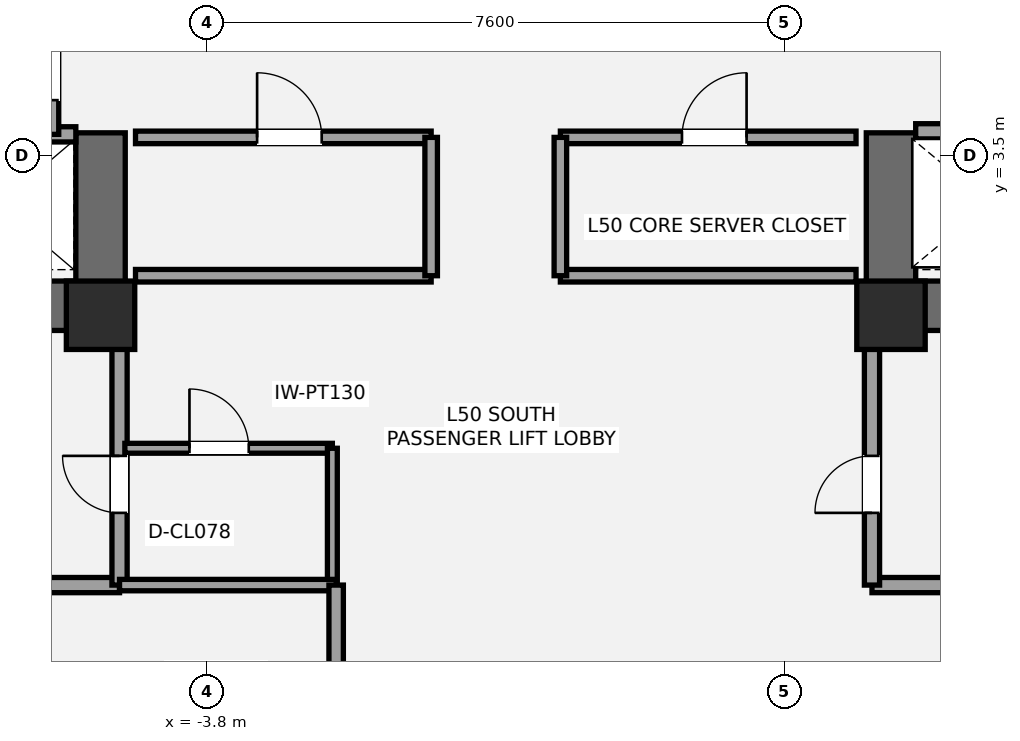
"""IFC4 building model, lengths in metres.
Left out: names, types, materials, properties, quantities, classifications, styles, units other than length and angle.
Written with IfcOpenShell. Run it as: python <this file> out.ifc"""

import sys

from ifc_helpers import new_model, si_unit, direction, frame, frame_2d, origin, origin_2d, place, context, subcontext, project, spatial, rectangle, extrude, element, fill, save


model = new_model("IFC4")
c1 = context("Model", 3, precision=1e-05, world=origin(), true_north=direction((0.0, 1.0)))
c2 = subcontext(c1, "Body", "Model", "MODEL_VIEW")
j1 = project(units=[si_unit("LENGTHUNIT", "METRE"), si_unit("PLANEANGLEUNIT", "RADIAN")], contexts=[c1])
p1 = place(None, origin())
s1 = spatial("IfcSite", under=j1, at=p1, CompositionType="ELEMENT")
p2 = place(p1, origin())
s2 = spatial("IfcBuilding", under=s1, at=p2, CompositionType="ELEMENT")
p3 = place(p2, frame((0.0, 0.0, 182.2)))
s3 = spatial("IfcBuildingStorey", under=s2, at=p3, CompositionType="ELEMENT", Elevation=182.2)
p4 = place(p3, frame((-4.875, 1.525, 0.0), z_axis=(0.0, 0.0, 1.0), x_axis=(-1.0, 0.0, 0.0)))
e1 = element("IfcWall", 1, at=p4, inside=s3, PredefinedType="SHEAR", context=c2, shape_type="SweptSolid", body=[
    extrude(rectangle(XDim=8.925, YDim=0.65, at=frame_2d((4.462, 0.0))), origin(), (0.0, 0.0, 1.0), 3.2),
])
p5 = place(p4, frame((5.425, 0.0, 0.0)))
e2 = element("IfcOpeningElement", 2, at=p5, cuts=e1, PredefinedType="OPENING", context=c2, shape_type="SweptSolid", body=[
    extrude(rectangle(XDim=1.05, YDim=2.15, at=frame_2d((0.525, 1.075))), frame((0.0, 0.335, 0.0), z_axis=(0.0, -1.0, 0.0), x_axis=(1.0, 0.0, 0.0)), (0.0, 0.0, 1.0), 0.67),
])
p6 = place(p4, frame((3.755, 0.0, 0.0)))
e3 = element("IfcOpeningElement", 3, at=p6, cuts=e1, PredefinedType="OPENING", context=c2, shape_type="SweptSolid", body=[
    extrude(rectangle(XDim=1.1, YDim=2.2, at=frame_2d((0.55, 1.1))), frame((0.0, 0.335, 0.0), z_axis=(0.0, -1.0, 0.0), x_axis=(1.0, 0.0, 0.0)), (0.0, 0.0, 1.0), 0.67),
])
p7 = place(p3, frame((-5.2, 1.2, 0.0), z_axis=(0.0, 0.0, 1.0), x_axis=(0.0, 1.0, 0.0)))
e4 = element("IfcWall", 4, at=p7, inside=s3, PredefinedType="SHEAR", context=c2, shape_type="SweptSolid", body=[
    extrude(rectangle(XDim=2.6, YDim=0.65, at=frame_2d((1.3, 0.0))), origin(), (0.0, 0.0, 1.0), 3.2),
])
p8 = place(p3, frame((13.8, 1.525, 0.0), z_axis=(0.0, 0.0, 1.0), x_axis=(-1.0, 0.0, 0.0)))
e5 = element("IfcWall", 5, at=p8, inside=s3, PredefinedType="SHEAR", context=c2, shape_type="SweptSolid", body=[
    extrude(rectangle(XDim=8.925, YDim=0.65, at=frame_2d((4.462, 0.0))), origin(), (0.0, 0.0, 1.0), 3.2),
])
p9 = place(p8, frame((2.45, 0.0, 0.0)))
e6 = element("IfcOpeningElement", 6, at=p9, cuts=e5, PredefinedType="OPENING", context=c2, shape_type="SweptSolid", body=[
    extrude(rectangle(XDim=1.05, YDim=2.15, at=frame_2d((0.525, 1.075))), frame((0.0, 0.335, 0.0), z_axis=(0.0, -1.0, 0.0), x_axis=(1.0, 0.0, 0.0)), (0.0, 0.0, 1.0), 0.67),
])
p10 = place(p8, frame((4.45, 0.0, 0.0)))
e7 = element("IfcOpeningElement", 7, at=p10, cuts=e5, PredefinedType="OPENING", context=c2, shape_type="SweptSolid", body=[
    extrude(rectangle(XDim=1.1, YDim=2.2, at=frame_2d((0.55, 1.1))), frame((0.0, 0.335, 0.0), z_axis=(0.0, -1.0, 0.0), x_axis=(1.0, 0.0, 0.0)), (0.0, 0.0, 1.0), 0.67),
])
p11 = place(p3, frame((5.2, 1.2, 0.0), z_axis=(0.0, 0.0, 1.0), x_axis=(0.0, 1.0, 0.0)))
e8 = element("IfcWall", 8, at=p11, inside=s3, PredefinedType="SHEAR", context=c2, shape_type="SweptSolid", body=[
    extrude(rectangle(XDim=2.6, YDim=0.65, at=frame_2d((1.3, 0.0))), origin(), (0.0, 0.0, 1.0), 3.2),
])
for number, where, z_axis, x_axis in (
    (9, (-5.2, 1.4, 0.0), (0.0, 0.0, 1.0), (1.0, 0.0, 0.0)),
    (10, (5.2, 1.4, 0.0), (0.0, 0.0, 1.0), (1.0, 0.0, 0.0)),
):
    element("IfcColumn", number, at=place(p3, frame(where, z_axis=z_axis, x_axis=x_axis)), inside=s3, PredefinedType="COLUMN", context=c2, shape_type="SweptSolid", body=[
        extrude(rectangle(XDim=0.9, YDim=0.9, at=origin_2d()), origin(), (0.0, 0.0, 1.0), 3.2),
    ])
p12 = place(p3, frame((-7.2, -2.15, 0.0), z_axis=(0.0, 0.0, 1.0), x_axis=(1.0, 0.0, 0.0)))
e11 = element("IfcWall", 11, at=p12, inside=s3, PredefinedType="SOLIDWALL", context=c2, shape_type="SweptSolid", body=[
    extrude(rectangle(XDim=2.25, YDim=0.2, at=frame_2d((1.125, 0.0))), origin(), (0.0, 0.0, 1.0), 3.02),
])
p13 = place(p3, frame((-4.95, -2.15, 0.0), z_axis=(0.0, 0.0, 1.0), x_axis=(0.0, 1.0, 0.0)))
e12 = element("IfcWall", 12, at=p13, inside=s3, PredefinedType="SOLIDWALL", context=c2, shape_type="SweptSolid", body=[
    extrude(rectangle(XDim=3.4, YDim=0.2, at=frame_2d((1.7, 0.0))), origin(), (0.0, 0.0, 1.0), 2.473),
])
p14 = place(p13, frame((0.95, 0.0, 0.0)))
e13 = element("IfcOpeningElement", 13, at=p14, cuts=e12, PredefinedType="OPENING", context=c2, shape_type="SweptSolid", body=[
    extrude(rectangle(XDim=0.75, YDim=2.1, at=frame_2d((0.375, 1.05))), frame((0.0, 0.11, 0.0), z_axis=(0.0, -1.0, 0.0), x_axis=(1.0, 0.0, 0.0)), (0.0, 0.0, 1.0), 0.22),
])
p15 = place(p3, frame((4.95, -2.15, 0.0), z_axis=(0.0, 0.0, 1.0), x_axis=(1.0, 0.0, 0.0)))
e14 = element("IfcWall", 14, at=p15, inside=s3, PredefinedType="SOLIDWALL", context=c2, shape_type="SweptSolid", body=[
    extrude(rectangle(XDim=2.25, YDim=0.2, at=frame_2d((1.125, 0.0))), origin(), (0.0, 0.0, 1.0), 3.02),
])
p16 = place(p3, frame((4.95, -2.15, 0.0), z_axis=(0.0, 0.0, 1.0), x_axis=(0.0, 1.0, 0.0)))
e15 = element("IfcWall", 15, at=p16, inside=s3, PredefinedType="SOLIDWALL", context=c2, shape_type="SweptSolid", body=[
    extrude(rectangle(XDim=3.4, YDim=0.2, at=frame_2d((1.7, 0.0))), origin(), (0.0, 0.0, 1.0), 2.473),
])
p17 = place(p16, frame((0.95, 0.0, 0.0)))
e16 = element("IfcOpeningElement", 16, at=p17, cuts=e15, PredefinedType="OPENING", context=c2, shape_type="SweptSolid", body=[
    extrude(rectangle(XDim=0.75, YDim=2.1, at=frame_2d((0.375, 1.05))), frame((0.0, 0.11, 0.0), z_axis=(0.0, -1.0, 0.0), x_axis=(1.0, 0.0, 0.0)), (0.0, 0.0, 1.0), 0.22),
])
p18 = place(p3, frame((-4.88, -0.35, 0.0), z_axis=(0.0, 0.0, 1.0), x_axis=(1.0, 0.0, 0.0)))
e17 = element("IfcWall", 17, at=p18, inside=s3, PredefinedType="PARTITIONING", context=c2, shape_type="SweptSolid", body=[
    extrude(rectangle(XDim=2.73, YDim=0.13, at=frame_2d((1.365, 0.0))), origin(), (0.0, 0.0, 1.0), 3.02),
])
p19 = place(p18, frame((0.85, 0.0, 0.0)))
e18 = element("IfcOpeningElement", 18, at=p19, cuts=e17, PredefinedType="OPENING", context=c2, shape_type="SweptSolid", body=[
    extrude(rectangle(XDim=0.78, YDim=2.1, at=frame_2d((0.39, 1.05))), frame((0.0, 0.075, 0.0), z_axis=(0.0, -1.0, 0.0), x_axis=(1.0, 0.0, 0.0)), (0.0, 0.0, 1.0), 0.15),
])
p20 = place(p3, frame((-2.15, -2.15, 0.0), z_axis=(0.0, 0.0, 1.0), x_axis=(0.0, 1.0, 0.0)))
e19 = element("IfcWall", 19, at=p20, inside=s3, PredefinedType="PARTITIONING", context=c2, shape_type="SweptSolid", body=[
    extrude(rectangle(XDim=1.8, YDim=0.13, at=frame_2d((0.9, 0.0))), origin(), (0.0, 0.0, 1.0), 3.02),
])
p21 = place(p3, frame((-9.78, 3.78, 0.0), z_axis=(0.0, 0.0, 1.0), x_axis=(1.0, 0.0, 0.0)))
e20 = element("IfcWall", 20, at=p21, inside=s3, PredefinedType="SOLIDWALL", context=c2, shape_type="SweptSolid", body=[
    extrude(rectangle(XDim=4.255, YDim=0.2, at=frame_2d((2.127, 0.0))), origin(), (0.0, 0.0, 1.0), 3.02),
])
p22 = place(p3, frame((-5.85, 3.78, 0.0), z_axis=(0.0, 0.0, 1.0), x_axis=(0.0, 1.0, 0.0)))
e21 = element("IfcWall", 21, at=p22, inside=s3, PredefinedType="SOLIDWALL", context=c2, shape_type="SweptSolid", body=[
    extrude(rectangle(XDim=1.69, YDim=0.2, at=frame_2d((0.845, 0.0))), origin(), (0.0, 0.0, 1.0), 3.02),
])
p23 = place(p22, frame((0.45, 0.0, 0.0)))
e22 = element("IfcOpeningElement", 22, at=p23, cuts=e21, PredefinedType="OPENING", context=c2, shape_type="SweptSolid", body=[
    extrude(rectangle(XDim=0.75, YDim=2.1, at=frame_2d((0.375, 1.05))), frame((0.0, 0.11, 0.0), z_axis=(0.0, -1.0, 0.0), x_axis=(1.0, 0.0, 0.0)), (0.0, 0.0, 1.0), 0.22),
])
p24 = place(p3, frame((5.525, 3.82, 0.0), z_axis=(0.0, 0.0, 1.0), x_axis=(1.0, 0.0, 0.0)))
e23 = element("IfcWall", 23, at=p24, inside=s3, PredefinedType="SOLIDWALL", context=c2, shape_type="SweptSolid", body=[
    extrude(rectangle(XDim=4.255, YDim=0.2, at=frame_2d((2.127, 0.0))), origin(), (0.0, 0.0, 1.0), 3.02),
])
p25 = place(p24, frame((0.65, 0.0, 0.0)))
e24 = element("IfcOpeningElement", 24, at=p25, cuts=e23, PredefinedType="OPENING", context=c2, shape_type="SweptSolid", body=[
    extrude(rectangle(XDim=1.2, YDim=2.2, at=frame_2d((0.6, 1.1))), frame((0.0, 0.11, 0.0), z_axis=(0.0, -1.0, 0.0), x_axis=(1.0, 0.0, 0.0)), (0.0, 0.0, 1.0), 0.22),
])
p26 = place(p3, frame((-4.74, 1.92, 0.0), z_axis=(0.0, 0.0, 1.0), x_axis=(1.0, 0.0, 0.0)))
e25 = element("IfcWall", 25, at=p26, inside=s3, PredefinedType="PARTITIONING", context=c2, shape_type="SweptSolid", body=[
    extrude(rectangle(XDim=3.89, YDim=0.165, at=frame_2d((1.945, 0.0))), origin(), (0.0, 0.0, 1.0), 2.16),
])
p27 = place(p3, frame((-4.74, 3.74, 0.0), z_axis=(0.0, 0.0, 1.0), x_axis=(1.0, 0.0, 0.0)))
e26 = element("IfcWall", 26, at=p27, inside=s3, PredefinedType="PARTITIONING", context=c2, shape_type="SweptSolid", body=[
    extrude(rectangle(XDim=3.89, YDim=0.165, at=frame_2d((1.945, 0.0))), origin(), (0.0, 0.0, 1.0), 3.02),
])
p28 = place(p27, frame((1.6, 0.0, 0.0)))
e27 = element("IfcOpeningElement", 27, at=p28, cuts=e26, PredefinedType="OPENING", context=c2, shape_type="SweptSolid", body=[
    extrude(rectangle(XDim=0.85, YDim=2.1, at=frame_2d((0.425, 1.05))), frame((0.0, 0.093, 0.0), z_axis=(0.0, -1.0, 0.0), x_axis=(1.0, 0.0, 0.0)), (0.0, 0.0, 1.0), 0.185),
])
p29 = place(p3, frame((-0.85, 1.92, 0.0), z_axis=(0.0, 0.0, 1.0), x_axis=(0.0, 1.0, 0.0)))
e28 = element("IfcWall", 28, at=p29, inside=s3, PredefinedType="PARTITIONING", context=c2, shape_type="SweptSolid", body=[
    extrude(rectangle(XDim=1.82, YDim=0.165, at=frame_2d((0.91, 0.0))), origin(), (0.0, 0.0, 1.0), 3.02),
])
p30 = place(p3, frame((0.85, 1.92, 0.0), z_axis=(0.0, 0.0, 1.0), x_axis=(1.0, 0.0, 0.0)))
e29 = element("IfcWall", 29, at=p30, inside=s3, PredefinedType="PARTITIONING", context=c2, shape_type="SweptSolid", body=[
    extrude(rectangle(XDim=3.89, YDim=0.165, at=frame_2d((1.945, 0.0))), origin(), (0.0, 0.0, 1.0), 2.16),
])
p31 = place(p3, frame((0.85, 3.74, 0.0), z_axis=(0.0, 0.0, 1.0), x_axis=(1.0, 0.0, 0.0)))
e30 = element("IfcWall", 30, at=p31, inside=s3, PredefinedType="PARTITIONING", context=c2, shape_type="SweptSolid", body=[
    extrude(rectangle(XDim=3.89, YDim=0.165, at=frame_2d((1.945, 0.0))), origin(), (0.0, 0.0, 1.0), 3.02),
])
p32 = place(p31, frame((1.6, 0.0, 0.0)))
e31 = element("IfcOpeningElement", 31, at=p32, cuts=e30, PredefinedType="OPENING", context=c2, shape_type="SweptSolid", body=[
    extrude(rectangle(XDim=0.85, YDim=2.1, at=frame_2d((0.425, 1.05))), frame((0.0, 0.093, 0.0), z_axis=(0.0, -1.0, 0.0), x_axis=(1.0, 0.0, 0.0)), (0.0, 0.0, 1.0), 0.185),
])
p33 = place(p3, frame((0.85, 1.92, 0.0), z_axis=(0.0, 0.0, 1.0), x_axis=(0.0, 1.0, 0.0)))
e32 = element("IfcWall", 32, at=p33, inside=s3, PredefinedType="PARTITIONING", context=c2, shape_type="SweptSolid", body=[
    extrude(rectangle(XDim=1.82, YDim=0.165, at=frame_2d((0.91, 0.0))), origin(), (0.0, 0.0, 1.0), 3.02),
])
p34 = place(p3, frame((-4.95, -2.15, 0.0), z_axis=(0.0, 0.0, 1.0), x_axis=(1.0, 0.0, 0.0)))
e33 = element("IfcWall", 33, at=p34, inside=s3, PredefinedType="PLUMBINGWALL", context=c2, shape_type="SweptSolid", body=[
    extrude(rectangle(XDim=2.85, YDim=0.15, at=frame_2d((1.425, 0.0))), origin(), (0.0, 0.0, 1.0), 2.473),
])
p35 = place(p3, frame((-2.1, -4.05, 0.0), z_axis=(0.0, 0.0, 1.0), x_axis=(0.0, 1.0, 0.0)))
e34 = element("IfcWall", 34, at=p35, inside=s3, PredefinedType="PLUMBINGWALL", context=c2, shape_type="SweptSolid", body=[
    extrude(rectangle(XDim=1.9, YDim=0.19, at=frame_2d((0.95, 0.0))), origin(), (0.0, 0.0, 1.0), 3.02),
])
p36 = place(p14, origin())
e35 = element("IfcDoor", 35, at=p36, inside=s3, OperationType="SINGLE_SWING_RIGHT", PredefinedType="DOOR", context=c2, shape_type="SweptSolid", body=[
    extrude(rectangle(XDim=0.75, YDim=2.1, at=frame_2d((0.375, 1.05))), frame((0.0, 0.025, 0.0), z_axis=(0.0, -1.0, 0.0), x_axis=(1.0, 0.0, 0.0)), (0.0, 0.0, 1.0), 0.05),
])
fill(e13, e35)
p37 = place(p17, origin())
e36 = element("IfcDoor", 36, at=p37, inside=s3, OperationType="SINGLE_SWING_LEFT", PredefinedType="DOOR", context=c2, shape_type="SweptSolid", body=[
    extrude(rectangle(XDim=0.75, YDim=2.1, at=frame_2d((0.375, 1.05))), frame((0.0, 0.025, 0.0), z_axis=(0.0, -1.0, 0.0), x_axis=(1.0, 0.0, 0.0)), (0.0, 0.0, 1.0), 0.05),
])
fill(e16, e36)
p38 = place(p19, origin())
e37 = element("IfcDoor", 37, at=p38, inside=s3, OperationType="SINGLE_SWING_LEFT", PredefinedType="DOOR", context=c2, shape_type="SweptSolid", body=[
    extrude(rectangle(XDim=0.78, YDim=2.1, at=frame_2d((0.39, 1.05))), frame((0.0, 0.025, 0.0), z_axis=(0.0, -1.0, 0.0), x_axis=(1.0, 0.0, 0.0)), (0.0, 0.0, 1.0), 0.05),
])
fill(e18, e37)
p39 = place(p23, origin())
e38 = element("IfcDoor", 38, at=p39, inside=s3, OperationType="SINGLE_SWING_RIGHT", PredefinedType="DOOR", context=c2, shape_type="SweptSolid", body=[
    extrude(rectangle(XDim=0.75, YDim=2.1, at=frame_2d((0.375, 1.05))), frame((0.0, 0.025, 0.0), z_axis=(0.0, -1.0, 0.0), x_axis=(1.0, 0.0, 0.0)), (0.0, 0.0, 1.0), 0.05),
])
fill(e22, e38)
p40 = place(p28, origin())
e39 = element("IfcDoor", 39, at=p40, inside=s3, OperationType="SINGLE_SWING_LEFT", PredefinedType="DOOR", context=c2, shape_type="SweptSolid", body=[
    extrude(rectangle(XDim=0.85, YDim=2.1, at=frame_2d((0.425, 1.05))), frame((0.0, 0.025, 0.0), z_axis=(0.0, -1.0, 0.0), x_axis=(1.0, 0.0, 0.0)), (0.0, 0.0, 1.0), 0.05),
])
fill(e27, e39)
p41 = place(p32, origin())
e40 = element("IfcDoor", 40, at=p41, inside=s3, OperationType="SINGLE_SWING_RIGHT", PredefinedType="DOOR", context=c2, shape_type="SweptSolid", body=[
    extrude(rectangle(XDim=0.85, YDim=2.1, at=frame_2d((0.425, 1.05))), frame((0.0, 0.025, 0.0), z_axis=(0.0, -1.0, 0.0), x_axis=(1.0, 0.0, 0.0)), (0.0, 0.0, 1.0), 0.05),
])
fill(e31, e40)
save(model, sys.argv[1])
